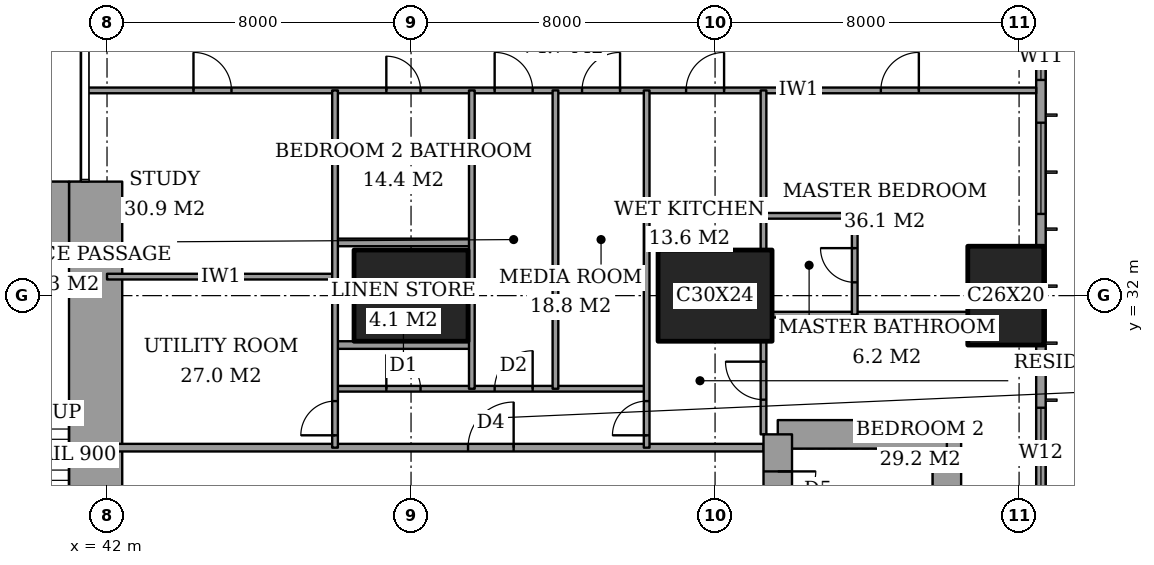
"""IFC4 building model, lengths in metres.
Left out: names, types, materials, properties, quantities, classifications, styles, units other than length and angle.
Written with IfcOpenShell. Run it as: python <this file> out.ifc"""

import sys

from ifc_helpers import new_model, si_unit, direction, frame, frame_2d, origin, origin_2d, place, context, subcontext, project, spatial, rectangle, extrude, element, fill, save


model = new_model("IFC4")
c1 = context("Model", 3, precision=1e-05, world=origin(), true_north=direction((0.0, 1.0)))
c2 = subcontext(c1, "Body", "Model", "MODEL_VIEW")
j1 = project(units=[si_unit("LENGTHUNIT", "METRE"), si_unit("PLANEANGLEUNIT", "RADIAN")], contexts=[c1])
p1 = place(None, origin())
s1 = spatial("IfcSite", under=j1, at=p1, CompositionType="ELEMENT")
p2 = place(p1, origin())
s2 = spatial("IfcBuilding", under=s1, at=p2, CompositionType="ELEMENT")
p3 = place(p2, frame((0.0, 0.0, 128.6)))
s3 = spatial("IfcBuildingStorey", under=s2, at=p3, CompositionType="ELEMENT", Elevation=128.6)
for number, where, z_axis, x_axis in (
    (1, (50.0, 32.0, 0.0), (0.0, 0.0, 1.0), (1.0, 0.0, 0.0)),
    (2, (58.0, 32.0, 0.0), (0.0, 0.0, 1.0), (1.0, 0.0, 0.0)),
):
    element("IfcColumn", number, at=place(p3, frame(where, z_axis=z_axis, x_axis=x_axis)), inside=s3, PredefinedType="COLUMN", context=c2, shape_type="SweptSolid", body=[
        extrude(rectangle(XDim=3.0, YDim=2.4, at=origin_2d()), origin(), (0.0, 0.0, 1.0), 3.6),
    ])
p4 = place(p3, frame((65.65, 32.0, 0.0), z_axis=(0.0, 0.0, 1.0), x_axis=(0.0, 1.0, 0.0)))
e3 = element("IfcColumn", 3, at=p4, inside=s3, PredefinedType="COLUMN", context=c2, shape_type="SweptSolid", body=[
    extrude(rectangle(XDim=2.6, YDim=2.0, at=origin_2d()), origin(), (0.0, 0.0, 1.0), 3.6),
])
p5 = place(p3, frame((37.85, 34.0, 0.0), z_axis=(0.0, 0.0, 1.0), x_axis=(1.0, 0.0, 0.0)))
e4 = element("IfcWall", 4, at=p5, inside=s3, PredefinedType="SHEAR", context=c2, shape_type="SweptSolid", body=[
    extrude(rectangle(XDim=3.15, YDim=2.0, at=frame_2d((1.575, 0.0))), origin(), (0.0, 0.0, 1.0), 3.6),
])
p6 = place(p3, frame((41.7, 24.85, 0.0), z_axis=(0.0, 0.0, 1.0), x_axis=(0.0, 1.0, 0.0)))
e5 = element("IfcWall", 5, at=p6, inside=s3, PredefinedType="SHEAR", context=c2, shape_type="SweptSolid", body=[
    extrude(rectangle(XDim=10.15, YDim=1.4, at=frame_2d((5.075, 0.0))), origin(), (0.0, 0.0, 1.0), 3.6),
])
p7 = place(p3, frame((64.1, 19.65, 0.0), z_axis=(0.0, 0.0, 1.0), x_axis=(0.0, 1.0, 0.0)))
e6 = element("IfcWall", 6, at=p7, inside=s3, PredefinedType="SHEAR", context=c2, shape_type="SweptSolid", body=[
    extrude(rectangle(XDim=8.7, YDim=0.75, at=frame_2d((4.35, 0.0))), origin(), (0.0, 0.0, 1.0), 3.6),
])
p8 = place(p3, frame((64.1, 28.35, 0.0), z_axis=(0.0, 0.0, 1.0), x_axis=(-1.0, 0.0, 0.0)))
e7 = element("IfcWall", 7, at=p8, inside=s3, PredefinedType="SHEAR", context=c2, shape_type="SweptSolid", body=[
    extrude(rectangle(XDim=4.45, YDim=0.75, at=frame_2d((2.225, 0.0))), origin(), (0.0, 0.0, 1.0), 3.6),
])
p9 = place(p3, frame((59.65, 28.35, 0.0), z_axis=(0.0, 0.0, 1.0), x_axis=(0.0, -1.0, 0.0)))
e8 = element("IfcWall", 8, at=p9, inside=s3, PredefinedType="SHEAR", context=c2, shape_type="SweptSolid", body=[
    extrude(rectangle(XDim=8.7, YDim=0.75, at=frame_2d((4.35, 0.0))), origin(), (0.0, 0.0, 1.0), 3.6),
])
p10 = place(p9, frame((0.975, 0.0, 0.0)))
e9 = element("IfcOpeningElement", 9, at=p10, cuts=e8, PredefinedType="OPENING", context=c2, shape_type="SweptSolid", body=[
    extrude(rectangle(XDim=1.0, YDim=2.1, at=frame_2d((0.5, 1.05))), frame((0.0, 0.385, 0.0), z_axis=(0.0, -1.0, 0.0), x_axis=(1.0, 0.0, 0.0)), (0.0, 0.0, 1.0), 0.77),
])
p11 = place(p3, frame((66.575, 3.175, 0.0), z_axis=(0.0, 0.0, 1.0), x_axis=(0.0, 1.0, 0.0)))
e10 = element("IfcWall", 10, at=p11, inside=s3, PredefinedType="SOLIDWALL", context=c2, shape_type="SweptSolid", body=[
    extrude(rectangle(XDim=41.65, YDim=0.25, at=frame_2d((20.825, 0.0))), origin(), (0.0, 0.0, 1.0), 3.6),
])
p12 = place(p11, frame((0.775, 0.0, 0.4)))
e11 = element("IfcOpeningElement", 11, at=p12, cuts=e10, PredefinedType="OPENING", context=c2, shape_type="SweptSolid", body=[
    extrude(rectangle(XDim=2.4, YDim=2.2, at=frame_2d((1.2, 1.1))), frame((0.0, 0.135, 0.0), z_axis=(0.0, -1.0, 0.0), x_axis=(1.0, 0.0, 0.0)), (0.0, 0.0, 1.0), 0.27),
])
p13 = place(p11, frame((6.125, 0.0, 0.4)))
e12 = element("IfcOpeningElement", 12, at=p13, cuts=e10, PredefinedType="OPENING", context=c2, shape_type="SweptSolid", body=[
    extrude(rectangle(XDim=1.2, YDim=2.2, at=frame_2d((0.6, 1.1))), frame((0.0, 0.135, 0.0), z_axis=(0.0, -1.0, 0.0), x_axis=(1.0, 0.0, 0.0)), (0.0, 0.0, 1.0), 0.27),
])
p14 = place(p11, frame((8.375, 0.0, 0.4)))
e13 = element("IfcOpeningElement", 13, at=p14, cuts=e10, PredefinedType="OPENING", context=c2, shape_type="SweptSolid", body=[
    extrude(rectangle(XDim=2.4, YDim=2.2, at=frame_2d((1.2, 1.1))), frame((0.0, 0.135, 0.0), z_axis=(0.0, -1.0, 0.0), x_axis=(1.0, 0.0, 0.0)), (0.0, 0.0, 1.0), 0.27),
])
p15 = place(p11, frame((15.775, 0.0, 0.4)))
e14 = element("IfcOpeningElement", 14, at=p15, cuts=e10, PredefinedType="OPENING", context=c2, shape_type="SweptSolid", body=[
    extrude(rectangle(XDim=2.4, YDim=2.2, at=frame_2d((1.2, 1.1))), frame((0.0, 0.135, 0.0), z_axis=(0.0, -1.0, 0.0), x_axis=(1.0, 0.0, 0.0)), (0.0, 0.0, 1.0), 0.27),
])
p16 = place(p11, frame((23.475, 0.0, 0.4)))
e15 = element("IfcOpeningElement", 15, at=p16, cuts=e10, PredefinedType="OPENING", context=c2, shape_type="SweptSolid", body=[
    extrude(rectangle(XDim=2.4, YDim=2.2, at=frame_2d((1.2, 1.1))), frame((0.0, 0.135, 0.0), z_axis=(0.0, -1.0, 0.0), x_axis=(1.0, 0.0, 0.0)), (0.0, 0.0, 1.0), 0.27),
])
p17 = place(p11, frame((30.975, 0.0, 0.4)))
e16 = element("IfcOpeningElement", 16, at=p17, cuts=e10, PredefinedType="OPENING", context=c2, shape_type="SweptSolid", body=[
    extrude(rectangle(XDim=2.4, YDim=2.2, at=frame_2d((1.2, 1.1))), frame((0.0, 0.135, 0.0), z_axis=(0.0, -1.0, 0.0), x_axis=(1.0, 0.0, 0.0)), (0.0, 0.0, 1.0), 0.27),
])
p18 = place(p11, frame((34.5, 0.0, 0.4)))
e17 = element("IfcOpeningElement", 17, at=p18, cuts=e10, PredefinedType="OPENING", context=c2, shape_type="SweptSolid", body=[
    extrude(rectangle(XDim=1.2, YDim=2.2, at=frame_2d((0.6, 1.1))), frame((0.0, 0.135, 0.0), z_axis=(0.0, -1.0, 0.0), x_axis=(1.0, 0.0, 0.0)), (0.0, 0.0, 1.0), 0.27),
])
p19 = place(p11, frame((38.475, 0.0, 0.4)))
e18 = element("IfcOpeningElement", 18, at=p19, cuts=e10, PredefinedType="OPENING", context=c2, shape_type="SweptSolid", body=[
    extrude(rectangle(XDim=2.4, YDim=2.2, at=frame_2d((1.2, 1.1))), frame((0.0, 0.135, 0.0), z_axis=(0.0, -1.0, 0.0), x_axis=(1.0, 0.0, 0.0)), (0.0, 0.0, 1.0), 0.27),
])
p20 = place(p3, frame((42.0, 28.0, 0.0), z_axis=(0.0, 0.0, 1.0), x_axis=(1.0, 0.0, 0.0)))
e19 = element("IfcWall", 19, at=p20, inside=s3, PredefinedType="PARTITIONING", context=c2, shape_type="SweptSolid", body=[
    extrude(rectangle(XDim=17.275, YDim=0.2, at=frame_2d((8.637, 0.0))), origin(), (0.0, 0.0, 1.0), 3.35),
])
p21 = place(p20, frame((9.5, 0.0, 0.0)))
e20 = element("IfcOpeningElement", 20, at=p21, cuts=e19, PredefinedType="OPENING", context=c2, shape_type="SweptSolid", body=[
    extrude(rectangle(XDim=1.2, YDim=2.4, at=frame_2d((0.6, 1.2))), frame((0.0, 0.11, 0.0), z_axis=(0.0, -1.0, 0.0), x_axis=(1.0, 0.0, 0.0)), (0.0, 0.0, 1.0), 0.22),
])
p22 = place(p3, frame((48.0, 29.55, 0.0), z_axis=(0.0, 0.0, 1.0), x_axis=(1.0, 0.0, 0.0)))
e21 = element("IfcWall", 21, at=p22, inside=s3, PredefinedType="PARTITIONING", context=c2, shape_type="SweptSolid", body=[
    extrude(rectangle(XDim=8.2, YDim=0.15, at=frame_2d((4.1, 0.0))), origin(), (0.0, 0.0, 1.0), 3.35),
])
p23 = place(p22, frame((4.2, 0.0, 0.0)))
e22 = element("IfcOpeningElement", 22, at=p23, cuts=e21, PredefinedType="OPENING", context=c2, shape_type="SweptSolid", body=[
    extrude(rectangle(XDim=1.0, YDim=2.1, at=frame_2d((0.5, 1.05))), frame((0.0, 0.085, 0.0), z_axis=(0.0, -1.0, 0.0), x_axis=(1.0, 0.0, 0.0)), (0.0, 0.0, 1.0), 0.17),
])
p24 = place(p22, frame((1.35, 0.0, 0.0)))
e23 = element("IfcOpeningElement", 23, at=p24, cuts=e21, PredefinedType="OPENING", context=c2, shape_type="SweptSolid", body=[
    extrude(rectangle(XDim=0.9, YDim=2.1, at=frame_2d((0.45, 1.05))), frame((0.0, 0.085, 0.0), z_axis=(0.0, -1.0, 0.0), x_axis=(1.0, 0.0, 0.0)), (0.0, 0.0, 1.0), 0.17),
])
p25 = place(p3, frame((48.0, 30.7, 0.0), z_axis=(0.0, 0.0, 1.0), x_axis=(1.0, 0.0, 0.0)))
e24 = element("IfcWall", 24, at=p25, inside=s3, PredefinedType="PARTITIONING", context=c2, shape_type="SweptSolid", body=[
    extrude(rectangle(XDim=3.6, YDim=0.2, at=frame_2d((1.8, 0.0))), origin(), (0.0, 0.0, 1.0), 3.35),
])
p26 = place(p3, frame((59.5, 31.5, 0.0), z_axis=(0.0, 0.0, 1.0), x_axis=(1.0, 0.0, 0.0)))
e25 = element("IfcWall", 25, at=p26, inside=s3, PredefinedType="PARTITIONING", context=c2, shape_type="SweptSolid", body=[
    extrude(rectangle(XDim=5.15, YDim=0.15, at=frame_2d((2.575, 0.0))), origin(), (0.0, 0.0, 1.0), 3.35),
])
p27 = place(p3, frame((42.0, 32.5, 0.0), z_axis=(0.0, 0.0, 1.0), x_axis=(1.0, 0.0, 0.0)))
e26 = element("IfcWall", 26, at=p27, inside=s3, PredefinedType="PARTITIONING", context=c2, shape_type="SweptSolid", body=[
    extrude(rectangle(XDim=6.0, YDim=0.15, at=frame_2d((3.0, 0.0))), origin(), (0.0, 0.0, 1.0), 3.35),
])
p28 = place(p3, frame((48.0, 33.4, 0.0), z_axis=(0.0, 0.0, 1.0), x_axis=(1.0, 0.0, 0.0)))
e27 = element("IfcWall", 27, at=p28, inside=s3, PredefinedType="PARTITIONING", context=c2, shape_type="SweptSolid", body=[
    extrude(rectangle(XDim=3.6, YDim=0.2, at=frame_2d((1.8, 0.0))), origin(), (0.0, 0.0, 1.0), 3.35),
])
p29 = place(p3, frame((59.275, 34.1, 0.0), z_axis=(0.0, 0.0, 1.0), x_axis=(1.0, 0.0, 0.0)))
e28 = element("IfcWall", 28, at=p29, inside=s3, PredefinedType="PARTITIONING", context=c2, shape_type="SweptSolid", body=[
    extrude(rectangle(XDim=2.4, YDim=0.15, at=frame_2d((1.2, 0.0))), origin(), (0.0, 0.0, 1.0), 3.35),
])
p30 = place(p3, frame((41.439, 37.4, 0.0), z_axis=(0.0, 0.0, 1.0), x_axis=(1.0, 0.0, 0.0)))
e29 = element("IfcWall", 29, at=p30, inside=s3, PredefinedType="PARTITIONING", context=c2, shape_type="SweptSolid", body=[
    extrude(rectangle(XDim=25.011, YDim=0.15, at=frame_2d((12.505, 0.0))), origin(), (0.0, 0.0, 1.0), 3.35),
])
p31 = place(p30, frame((10.761, 0.0, 0.0)))
e30 = element("IfcOpeningElement", 30, at=p31, cuts=e29, PredefinedType="OPENING", context=c2, shape_type="SweptSolid", body=[
    extrude(rectangle(XDim=1.0, YDim=2.1, at=frame_2d((0.5, 1.05))), frame((0.0, 0.085, 0.0), z_axis=(0.0, -1.0, 0.0), x_axis=(1.0, 0.0, 0.0)), (0.0, 0.0, 1.0), 0.17),
])
p32 = place(p30, frame((20.924, 0.0, 0.0)))
e31 = element("IfcOpeningElement", 31, at=p32, cuts=e29, PredefinedType="OPENING", context=c2, shape_type="SweptSolid", body=[
    extrude(rectangle(XDim=1.0, YDim=2.1, at=frame_2d((0.5, 1.05))), frame((0.0, 0.085, 0.0), z_axis=(0.0, -1.0, 0.0), x_axis=(1.0, 0.0, 0.0)), (0.0, 0.0, 1.0), 0.17),
])
p33 = place(p30, frame((15.799, 0.0, 0.0)))
e32 = element("IfcOpeningElement", 32, at=p33, cuts=e29, PredefinedType="OPENING", context=c2, shape_type="SweptSolid", body=[
    extrude(rectangle(XDim=1.0, YDim=2.1, at=frame_2d((0.5, 1.05))), frame((0.0, 0.085, 0.0), z_axis=(0.0, -1.0, 0.0), x_axis=(1.0, 0.0, 0.0)), (0.0, 0.0, 1.0), 0.17),
])
p34 = place(p30, frame((13.061, 0.0, 0.0)))
e33 = element("IfcOpeningElement", 33, at=p34, cuts=e29, PredefinedType="OPENING", context=c2, shape_type="SweptSolid", body=[
    extrude(rectangle(XDim=1.0, YDim=2.1, at=frame_2d((0.5, 1.05))), frame((0.0, 0.085, 0.0), z_axis=(0.0, -1.0, 0.0), x_axis=(1.0, 0.0, 0.0)), (0.0, 0.0, 1.0), 0.17),
])
p35 = place(p30, frame((7.911, 0.0, 0.0)))
e34 = element("IfcOpeningElement", 34, at=p35, cuts=e29, PredefinedType="OPENING", context=c2, shape_type="SweptSolid", body=[
    extrude(rectangle(XDim=0.9, YDim=2.1, at=frame_2d((0.45, 1.05))), frame((0.0, 0.085, 0.0), z_axis=(0.0, -1.0, 0.0), x_axis=(1.0, 0.0, 0.0)), (0.0, 0.0, 1.0), 0.17),
])
p36 = place(p30, frame((2.836, 0.0, 0.0)))
e35 = element("IfcOpeningElement", 35, at=p36, cuts=e29, PredefinedType="OPENING", context=c2, shape_type="SweptSolid", body=[
    extrude(rectangle(XDim=1.0, YDim=2.1, at=frame_2d((0.5, 1.05))), frame((0.0, 0.085, 0.0), z_axis=(0.0, -1.0, 0.0), x_axis=(1.0, 0.0, 0.0)), (0.0, 0.0, 1.0), 0.17),
])
p37 = place(p3, frame((48.0, 28.0, 0.0), z_axis=(0.0, 0.0, 1.0), x_axis=(0.0, 1.0, 0.0)))
e36 = element("IfcWall", 36, at=p37, inside=s3, PredefinedType="PARTITIONING", context=c2, shape_type="SweptSolid", body=[
    extrude(rectangle(XDim=9.4, YDim=0.15, at=frame_2d((4.7, 0.0))), origin(), (0.0, 0.0, 1.0), 3.35),
])
p38 = place(p37, frame((0.325, 0.0, 0.0)))
e37 = element("IfcOpeningElement", 37, at=p38, cuts=e36, PredefinedType="OPENING", context=c2, shape_type="SweptSolid", body=[
    extrude(rectangle(XDim=0.9, YDim=2.1, at=frame_2d((0.45, 1.05))), frame((0.0, 0.085, 0.0), z_axis=(0.0, -1.0, 0.0), x_axis=(1.0, 0.0, 0.0)), (0.0, 0.0, 1.0), 0.17),
])
for number, where, z_axis, x_axis in (
    (38, (51.6, 29.55, 0.0), (0.0, 0.0, 1.0), (0.0, 1.0, 0.0)),
    (39, (53.8, 29.55, 0.0), (0.0, 0.0, 1.0), (0.0, 1.0, 0.0)),
):
    element("IfcWall", number, at=place(p3, frame(where, z_axis=z_axis, x_axis=x_axis)), inside=s3, PredefinedType="PARTITIONING", context=c2, shape_type="SweptSolid", body=[
        extrude(rectangle(XDim=7.85, YDim=0.15, at=frame_2d((3.925, 0.0))), origin(), (0.0, 0.0, 1.0), 3.35),
    ])
p39 = place(p3, frame((56.2, 28.0, 0.0), z_axis=(0.0, 0.0, 1.0), x_axis=(0.0, 1.0, 0.0)))
e40 = element("IfcWall", 40, at=p39, inside=s3, PredefinedType="PARTITIONING", context=c2, shape_type="SweptSolid", body=[
    extrude(rectangle(XDim=9.4, YDim=0.15, at=frame_2d((4.7, 0.0))), origin(), (0.0, 0.0, 1.0), 3.35),
])
p40 = place(p39, frame((0.325, 0.0, 0.0)))
e41 = element("IfcOpeningElement", 41, at=p40, cuts=e40, PredefinedType="OPENING", context=c2, shape_type="SweptSolid", body=[
    extrude(rectangle(XDim=0.9, YDim=2.1, at=frame_2d((0.45, 1.05))), frame((0.0, 0.085, 0.0), z_axis=(0.0, -1.0, 0.0), x_axis=(1.0, 0.0, 0.0)), (0.0, 0.0, 1.0), 0.17),
])
p41 = place(p3, frame((59.275, 28.35, 0.0), z_axis=(0.0, 0.0, 1.0), x_axis=(0.0, 1.0, 0.0)))
e42 = element("IfcWall", 42, at=p41, inside=s3, PredefinedType="PARTITIONING", context=c2, shape_type="SweptSolid", body=[
    extrude(rectangle(XDim=2.45, YDim=0.15, at=frame_2d((1.225, 0.0))), origin(), (0.0, 0.0, 1.0), 3.35),
])
p42 = place(p41, frame((0.913, 0.0, 0.0)))
e43 = element("IfcOpeningElement", 43, at=p42, cuts=e42, PredefinedType="OPENING", context=c2, shape_type="SweptSolid", body=[
    extrude(rectangle(XDim=1.0, YDim=2.1, at=frame_2d((0.5, 1.05))), frame((0.0, 0.085, 0.0), z_axis=(0.0, -1.0, 0.0), x_axis=(1.0, 0.0, 0.0)), (0.0, 0.0, 1.0), 0.17),
])
p43 = place(p3, frame((59.275, 33.2, 0.0), z_axis=(0.0, 0.0, 1.0), x_axis=(0.0, 1.0, 0.0)))
e44 = element("IfcWall", 44, at=p43, inside=s3, PredefinedType="PARTITIONING", context=c2, shape_type="SweptSolid", body=[
    extrude(rectangle(XDim=4.2, YDim=0.15, at=frame_2d((2.1, 0.0))), origin(), (0.0, 0.0, 1.0), 3.35),
])
p44 = place(p3, frame((61.675, 31.5, 0.0), z_axis=(0.0, 0.0, 1.0), x_axis=(0.0, 1.0, 0.0)))
e45 = element("IfcWall", 45, at=p44, inside=s3, PredefinedType="PARTITIONING", context=c2, shape_type="SweptSolid", body=[
    extrude(rectangle(XDim=2.6, YDim=0.15, at=frame_2d((1.3, 0.0))), origin(), (0.0, 0.0, 1.0), 3.35),
])
p45 = place(p44, frame((0.85, 0.0, 0.0)))
e46 = element("IfcOpeningElement", 46, at=p45, cuts=e45, PredefinedType="OPENING", context=c2, shape_type="SweptSolid", body=[
    extrude(rectangle(XDim=0.9, YDim=2.1, at=frame_2d((0.45, 1.05))), frame((0.0, 0.085, 0.0), z_axis=(0.0, -1.0, 0.0), x_axis=(1.0, 0.0, 0.0)), (0.0, 0.0, 1.0), 0.17),
])
p46 = place(p16, origin())
e47 = element("IfcWindow", 47, at=p46, inside=s3, PartitioningType="SINGLE_PANEL", PredefinedType="WINDOW", context=c2, shape_type="SweptSolid", body=[
    extrude(rectangle(XDim=2.4, YDim=2.2, at=frame_2d((1.2, 1.1))), frame((0.0, 0.03, 0.0), z_axis=(0.0, -1.0, 0.0), x_axis=(1.0, 0.0, 0.0)), (0.0, 0.0, 1.0), 0.06),
])
fill(e15, e47)
p47 = place(p17, origin())
e48 = element("IfcWindow", 48, at=p47, inside=s3, PartitioningType="SINGLE_PANEL", PredefinedType="WINDOW", context=c2, shape_type="SweptSolid", body=[
    extrude(rectangle(XDim=2.4, YDim=2.2, at=frame_2d((1.2, 1.1))), frame((0.0, 0.03, 0.0), z_axis=(0.0, -1.0, 0.0), x_axis=(1.0, 0.0, 0.0)), (0.0, 0.0, 1.0), 0.06),
])
fill(e16, e48)
p48 = place(p18, origin())
e49 = element("IfcWindow", 49, at=p48, inside=s3, PartitioningType="SINGLE_PANEL", PredefinedType="WINDOW", context=c2, shape_type="SweptSolid", body=[
    extrude(rectangle(XDim=1.2, YDim=2.2, at=frame_2d((0.6, 1.1))), frame((0.0, 0.03, 0.0), z_axis=(0.0, -1.0, 0.0), x_axis=(1.0, 0.0, 0.0)), (0.0, 0.0, 1.0), 0.06),
])
fill(e17, e49)
p49 = place(p31, origin())
e50 = element("IfcDoor", 50, at=p49, inside=s3, OperationType="SINGLE_SWING_RIGHT", PredefinedType="DOOR", context=c2, shape_type="SweptSolid", body=[
    extrude(rectangle(XDim=1.0, YDim=2.1, at=frame_2d((0.5, 1.05))), frame((0.0, 0.025, 0.0), z_axis=(0.0, -1.0, 0.0), x_axis=(1.0, 0.0, 0.0)), (0.0, 0.0, 1.0), 0.05),
])
fill(e30, e50)
p50 = place(p45, origin())
e51 = element("IfcDoor", 51, at=p50, inside=s3, OperationType="SINGLE_SWING_LEFT", PredefinedType="DOOR", context=c2, shape_type="SweptSolid", body=[
    extrude(rectangle(XDim=0.9, YDim=2.1, at=frame_2d((0.45, 1.05))), frame((0.0, 0.025, 0.0), z_axis=(0.0, -1.0, 0.0), x_axis=(1.0, 0.0, 0.0)), (0.0, 0.0, 1.0), 0.05),
])
fill(e46, e51)
p51 = place(p32, origin())
e52 = element("IfcDoor", 52, at=p51, inside=s3, OperationType="SINGLE_SWING_LEFT", PredefinedType="DOOR", context=c2, shape_type="SweptSolid", body=[
    extrude(rectangle(XDim=1.0, YDim=2.1, at=frame_2d((0.5, 1.05))), frame((0.0, 0.025, 0.0), z_axis=(0.0, -1.0, 0.0), x_axis=(1.0, 0.0, 0.0)), (0.0, 0.0, 1.0), 0.05),
])
fill(e31, e52)
p52 = place(p42, origin())
e53 = element("IfcDoor", 53, at=p52, inside=s3, OperationType="SINGLE_SWING_LEFT", PredefinedType="DOOR", context=c2, shape_type="SweptSolid", body=[
    extrude(rectangle(XDim=1.0, YDim=2.1, at=frame_2d((0.5, 1.05))), frame((0.0, 0.025, 0.0), z_axis=(0.0, -1.0, 0.0), x_axis=(1.0, 0.0, 0.0)), (0.0, 0.0, 1.0), 0.05),
])
fill(e43, e53)
p53 = place(p33, origin())
e54 = element("IfcDoor", 54, at=p53, inside=s3, OperationType="SINGLE_SWING_LEFT", PredefinedType="DOOR", context=c2, shape_type="SweptSolid", body=[
    extrude(rectangle(XDim=1.0, YDim=2.1, at=frame_2d((0.5, 1.05))), frame((0.0, 0.025, 0.0), z_axis=(0.0, -1.0, 0.0), x_axis=(1.0, 0.0, 0.0)), (0.0, 0.0, 1.0), 0.05),
])
fill(e32, e54)
p54 = place(p40, origin())
e55 = element("IfcDoor", 55, at=p54, inside=s3, OperationType="SINGLE_SWING_RIGHT", PredefinedType="DOOR", context=c2, shape_type="SweptSolid", body=[
    extrude(rectangle(XDim=0.9, YDim=2.1, at=frame_2d((0.45, 1.05))), frame((0.0, 0.025, 0.0), z_axis=(0.0, -1.0, 0.0), x_axis=(1.0, 0.0, 0.0)), (0.0, 0.0, 1.0), 0.05),
])
fill(e41, e55)
p55 = place(p21, origin())
e56 = element("IfcDoor", 56, at=p55, inside=s3, OperationType="SINGLE_SWING_LEFT", PredefinedType="DOOR", context=c2, shape_type="SweptSolid", body=[
    extrude(rectangle(XDim=1.2, YDim=2.4, at=frame_2d((0.6, 1.2))), frame((0.0, 0.025, 0.0), z_axis=(0.0, -1.0, 0.0), x_axis=(1.0, 0.0, 0.0)), (0.0, 0.0, 1.0), 0.05),
])
fill(e20, e56)
p56 = place(p34, origin())
e57 = element("IfcDoor", 57, at=p56, inside=s3, OperationType="SINGLE_SWING_LEFT", PredefinedType="DOOR", context=c2, shape_type="SweptSolid", body=[
    extrude(rectangle(XDim=1.0, YDim=2.1, at=frame_2d((0.5, 1.05))), frame((0.0, 0.025, 0.0), z_axis=(0.0, -1.0, 0.0), x_axis=(1.0, 0.0, 0.0)), (0.0, 0.0, 1.0), 0.05),
])
fill(e33, e57)
p57 = place(p23, origin())
e58 = element("IfcDoor", 58, at=p57, inside=s3, OperationType="SINGLE_SWING_LEFT", PredefinedType="DOOR", context=c2, shape_type="SweptSolid", body=[
    extrude(rectangle(XDim=1.0, YDim=2.1, at=frame_2d((0.5, 1.05))), frame((0.0, 0.025, 0.0), z_axis=(0.0, -1.0, 0.0), x_axis=(1.0, 0.0, 0.0)), (0.0, 0.0, 1.0), 0.05),
])
fill(e22, e58)
p58 = place(p24, origin())
e59 = element("IfcDoor", 59, at=p58, inside=s3, OperationType="SINGLE_SWING_RIGHT", PredefinedType="DOOR", context=c2, shape_type="SweptSolid", body=[
    extrude(rectangle(XDim=0.9, YDim=2.1, at=frame_2d((0.45, 1.05))), frame((0.0, 0.025, 0.0), z_axis=(0.0, -1.0, 0.0), x_axis=(1.0, 0.0, 0.0)), (0.0, 0.0, 1.0), 0.05),
])
fill(e23, e59)
p59 = place(p35, origin())
e60 = element("IfcDoor", 60, at=p59, inside=s3, OperationType="SINGLE_SWING_RIGHT", PredefinedType="DOOR", context=c2, shape_type="SweptSolid", body=[
    extrude(rectangle(XDim=0.9, YDim=2.1, at=frame_2d((0.45, 1.05))), frame((0.0, 0.025, 0.0), z_axis=(0.0, -1.0, 0.0), x_axis=(1.0, 0.0, 0.0)), (0.0, 0.0, 1.0), 0.05),
])
fill(e34, e60)
p60 = place(p36, origin())
e61 = element("IfcDoor", 61, at=p60, inside=s3, OperationType="SINGLE_SWING_RIGHT", PredefinedType="DOOR", context=c2, shape_type="SweptSolid", body=[
    extrude(rectangle(XDim=1.0, YDim=2.1, at=frame_2d((0.5, 1.05))), frame((0.0, 0.025, 0.0), z_axis=(0.0, -1.0, 0.0), x_axis=(1.0, 0.0, 0.0)), (0.0, 0.0, 1.0), 0.05),
])
fill(e35, e61)
p61 = place(p38, origin())
e62 = element("IfcDoor", 62, at=p61, inside=s3, OperationType="SINGLE_SWING_RIGHT", PredefinedType="DOOR", context=c2, shape_type="SweptSolid", body=[
    extrude(rectangle(XDim=0.9, YDim=2.1, at=frame_2d((0.45, 1.05))), frame((0.0, 0.025, 0.0), z_axis=(0.0, -1.0, 0.0), x_axis=(1.0, 0.0, 0.0)), (0.0, 0.0, 1.0), 0.05),
])
fill(e37, e62)
p62 = place(p10, origin())
e63 = element("IfcDoor", 63, at=p62, inside=s3, OperationType="SINGLE_SWING_RIGHT", PredefinedType="DOOR", context=c2, shape_type="SweptSolid", body=[
    extrude(rectangle(XDim=1.0, YDim=2.1, at=frame_2d((0.5, 1.05))), frame((0.0, 0.025, 0.0), z_axis=(0.0, -1.0, 0.0), x_axis=(1.0, 0.0, 0.0)), (0.0, 0.0, 1.0), 0.05),
])
fill(e9, e63)
save(model, sys.argv[1])
